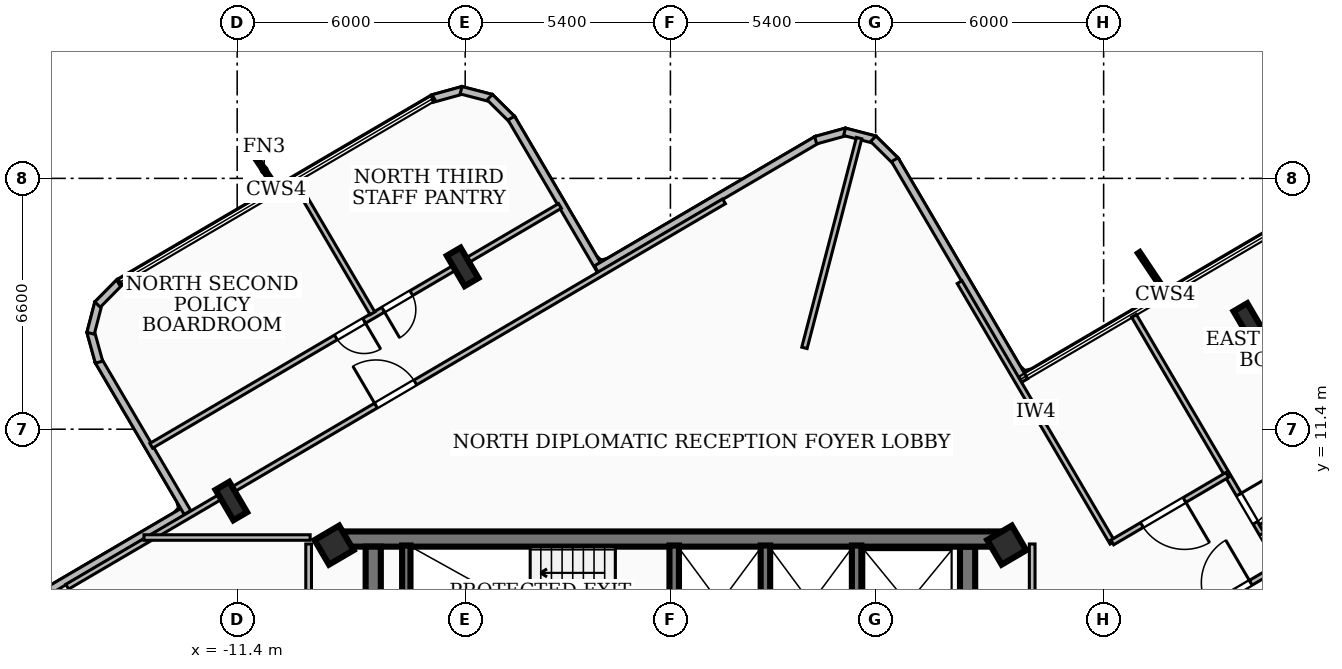
"""IFC4 building model, lengths in metres.
Left out: names, types, materials, properties, quantities, classifications, styles, units other than length and angle.
Written with IfcOpenShell. Run it as: python <this file> out.ifc"""

import sys

from ifc_helpers import new_model, si_unit, direction, frame, frame_2d, origin, origin_2d, place, context, subcontext, project, spatial, rectangle, i_section, extrude, element, fill, save


model = new_model("IFC4")
c1 = context("Model", 3, precision=1e-05, world=origin(), true_north=direction((0.0, 1.0)))
c2 = subcontext(c1, "Body", "Model", "MODEL_VIEW")
j1 = project(units=[si_unit("LENGTHUNIT", "METRE"), si_unit("PLANEANGLEUNIT", "RADIAN")], contexts=[c1])
p1 = place(None, origin())
s1 = spatial("IfcSite", under=j1, at=p1, CompositionType="ELEMENT")
p2 = place(p1, origin())
s2 = spatial("IfcBuilding", under=s1, at=p2, CompositionType="ELEMENT")
p3 = place(p2, frame((0.0, 0.0, 205.2)))
s3 = spatial("IfcBuildingStorey", under=s2, at=p3, CompositionType="ELEMENT", Elevation=205.2)
p4 = place(p3, frame((-8.78, 8.51, 0.0), z_axis=(0.0, 0.0, 1.0), x_axis=(1.0, 0.0, 0.0)))
e1 = element("IfcWall", 1, at=p4, inside=s3, PredefinedType="SHEAR", context=c2, shape_type="SweptSolid", body=[
    extrude(rectangle(XDim=17.56, YDim=0.4, at=frame_2d((8.78, 0.0))), origin(), (0.0, 0.0, 1.0), 3.16),
])
for number, where, z_axis, x_axis in (
    (2, (-7.82, 1.95, 0.0), (0.0, 0.0, 1.0), (0.0, 1.0, 0.0)),
    (3, (7.82, 8.31, 0.0), (0.0, 0.0, 1.0), (0.0, -1.0, 0.0)),
):
    element("IfcWall", number, at=place(p3, frame(where, z_axis=z_axis, x_axis=x_axis)), inside=s3, PredefinedType="SHEAR", context=c2, shape_type="SweptSolid", body=[
        extrude(rectangle(XDim=6.36, YDim=0.4, at=frame_2d((3.18, 0.0))), origin(), (0.0, 0.0, 1.0), 3.16),
    ])
p5 = place(p3, frame((-6.95, 5.28, 0.0), z_axis=(0.0, 0.0, 1.0), x_axis=(0.0, 1.0, 0.0)))
e4 = element("IfcWall", 4, at=p5, inside=s3, PredefinedType="SOLIDWALL", context=c2, shape_type="SweptSolid", body=[
    extrude(rectangle(XDim=3.06, YDim=0.22, at=frame_2d((1.53, 0.0))), origin(), (0.0, 0.0, 1.0), 3.16),
])
for number, where, z_axis, x_axis in (
    (5, (0.1, 5.3, 0.0), (0.0, 0.0, 1.0), (0.0, 1.0, 0.0)),
    (6, (2.5, 5.3, 0.0), (0.0, 0.0, 1.0), (0.0, 1.0, 0.0)),
    (7, (4.9, 5.3, 0.0), (0.0, 0.0, 1.0), (0.0, 1.0, 0.0)),
):
    element("IfcWall", number, at=place(p3, frame(where, z_axis=z_axis, x_axis=x_axis)), inside=s3, PredefinedType="SOLIDWALL", context=c2, shape_type="SweptSolid", body=[
        extrude(rectangle(XDim=3.04, YDim=0.25, at=frame_2d((1.52, 0.0))), origin(), (0.0, 0.0, 1.0), 3.16),
    ])
for number, where, z_axis, x_axis in (
    (8, (-8.85, 8.35, 0.0), (0.0, 0.0, 1.0), (0.863, 0.506, 0.0)),
    (9, (8.85, 8.35, 0.0), (0.0, 0.0, 1.0), (0.863, 0.506, 0.0)),
):
    element("IfcColumn", number, at=place(p3, frame(where, z_axis=z_axis, x_axis=x_axis)), inside=s3, PredefinedType="COLUMN", context=c2, shape_type="SweptSolid", body=[
        extrude(rectangle(XDim=0.75, YDim=0.75, at=origin_2d()), origin(), (0.0, 0.0, 1.0), 3.42),
    ])
for number, where, z_axis, x_axis in (
    (10, (15.234, 14.209, 0.0), (0.0, 0.0, 1.0), (0.863, 0.506, 0.0)),
    (11, (-5.468, 15.671, 0.0), (0.0, 0.0, 1.0), (0.863, 0.506, 0.0)),
    (12, (-11.554, 9.51, 0.0), (0.0, 0.0, 1.0), (0.863, 0.506, 0.0)),
):
    element("IfcColumn", number, at=place(p3, frame(where, z_axis=z_axis, x_axis=x_axis)), inside=s3, PredefinedType="COLUMN", context=c2, shape_type="SweptSolid", body=[
        extrude(i_section(OverallWidth=0.418, OverallDepth=0.927, WebThickness=0.019, FlangeThickness=0.032, at=origin_2d()), origin(), (0.0, 0.0, 1.0), 3.42),
    ])
p6 = place(p3, frame((-18.492, 5.904, 0.0), z_axis=(0.0, 0.0, 1.0), x_axis=(0.86245977502, 0.506125613333, 0.0)))
e13 = element("IfcWall", 13, at=p6, inside=s3, PredefinedType="SOLIDWALL", context=c2, shape_type="SweptSolid", body=[
    extrude(rectangle(XDim=6.741, YDim=0.2, at=frame_2d((3.371, 0.0))), origin(), (0.0, 0.0, 1.0), 3.16),
])
p7 = place(p3, frame((-12.707, 9.207, 0.0), z_axis=(0.0, 0.0, 1.0), x_axis=(-0.505936854923, 0.862570518178, 0.0)))
e14 = element("IfcWall", 14, at=p7, inside=s3, PredefinedType="SOLIDWALL", context=c2, shape_type="SweptSolid", body=[
    extrude(rectangle(XDim=4.641, YDim=0.2, at=frame_2d((2.32, 0.0))), origin(), (0.0, 0.0, 1.0), 3.16),
])
p8 = place(p3, frame((-15.035, 13.164, 0.0), z_axis=(0.0, 0.0, 1.0), x_axis=(-0.266246353668, 0.963905015631, 0.0)))
e15 = element("IfcWall", 15, at=p8, inside=s3, PredefinedType="SOLIDWALL", context=c2, shape_type="SweptSolid", body=[
    extrude(rectangle(XDim=0.838, YDim=0.2, at=frame_2d((0.419, 0.0))), origin(), (0.0, 0.0, 1.0), 3.16),
])
p9 = place(p3, frame((-15.257, 13.924, 0.0), z_axis=(0.0, 0.0, 1.0), x_axis=(0.251167733737, 0.967943577658, 0.0)))
e16 = element("IfcWall", 16, at=p9, inside=s3, PredefinedType="SOLIDWALL", context=c2, shape_type="SweptSolid", body=[
    extrude(rectangle(XDim=0.824, YDim=0.2, at=frame_2d((0.412, 0.0))), origin(), (0.0, 0.0, 1.0), 3.16),
])
p10 = place(p3, frame((-15.074, 14.68, 0.0), z_axis=(0.0, 0.0, 1.0), x_axis=(0.702877524881, 0.711310891957, 0.0)))
e17 = element("IfcWall", 17, at=p10, inside=s3, PredefinedType="SOLIDWALL", context=c2, shape_type="SweptSolid", body=[
    extrude(rectangle(XDim=0.84, YDim=0.2, at=frame_2d((0.42, 0.0))), origin(), (0.0, 0.0, 1.0), 3.16),
])
p11 = place(p3, frame((-6.269, 20.097, 0.0), z_axis=(0.0, 0.0, 1.0), x_axis=(0.963925656212, 0.266171616247, 0.0)))
e18 = element("IfcWall", 18, at=p11, inside=s3, PredefinedType="SOLIDWALL", context=c2, shape_type="SweptSolid", body=[
    extrude(rectangle(XDim=0.838, YDim=0.2, at=frame_2d((0.419, 0.0))), origin(), (0.0, 0.0, 1.0), 3.16),
])
p12 = place(p3, frame((-5.509, 20.319, 0.0), z_axis=(0.0, 0.0, 1.0), x_axis=(0.967962254737, -0.251095745493, 0.0)))
e19 = element("IfcWall", 19, at=p12, inside=s3, PredefinedType="SOLIDWALL", context=c2, shape_type="SweptSolid", body=[
    extrude(rectangle(XDim=0.824, YDim=0.2, at=frame_2d((0.412, 0.0))), origin(), (0.0, 0.0, 1.0), 3.16),
])
p13 = place(p3, frame((-4.753, 20.136, 0.0), z_axis=(0.0, 0.0, 1.0), x_axis=(0.711167178618, -0.70302293281, 0.0)))
e20 = element("IfcWall", 20, at=p13, inside=s3, PredefinedType="SOLIDWALL", context=c2, shape_type="SweptSolid", body=[
    extrude(rectangle(XDim=0.839, YDim=0.2, at=frame_2d((0.42, 0.0))), origin(), (0.0, 0.0, 1.0), 3.16),
])
p14 = place(p3, frame((-4.187, 19.586, 0.0), z_axis=(0.0, 0.0, 1.0), x_axis=(0.505936854923, -0.862570518178, 0.0)))
e21 = element("IfcWall", 21, at=p14, inside=s3, PredefinedType="SOLIDWALL", context=c2, shape_type="SweptSolid", body=[
    extrude(rectangle(XDim=4.641, YDim=0.2, at=frame_2d((2.32, 0.0))), origin(), (0.0, 0.0, 1.0), 3.16),
])
p15 = place(p3, frame((-1.948, 15.612, 0.0), z_axis=(0.0, 0.0, 1.0), x_axis=(0.86259717351, 0.505891407569, 0.0)))
e22 = element("IfcWall", 22, at=p15, inside=s3, PredefinedType="SOLIDWALL", context=c2, shape_type="SweptSolid", body=[
    extrude(rectangle(XDim=6.742, YDim=0.2, at=frame_2d((3.371, 0.0))), origin(), (0.0, 0.0, 1.0), 3.16),
])
p16 = place(p3, frame((3.822, 19.003, 0.0), z_axis=(0.0, 0.0, 1.0), x_axis=(0.963905015631, 0.266246353668, 0.0)))
e23 = element("IfcWall", 23, at=p16, inside=s3, PredefinedType="SOLIDWALL", context=c2, shape_type="SweptSolid", body=[
    extrude(rectangle(XDim=0.838, YDim=0.2, at=frame_2d((0.419, 0.0))), origin(), (0.0, 0.0, 1.0), 3.16),
])
p17 = place(p3, frame((4.582, 19.225, 0.0), z_axis=(0.0, 0.0, 1.0), x_axis=(0.967943577658, -0.251167733737, 0.0)))
e24 = element("IfcWall", 24, at=p17, inside=s3, PredefinedType="SOLIDWALL", context=c2, shape_type="SweptSolid", body=[
    extrude(rectangle(XDim=0.824, YDim=0.2, at=frame_2d((0.412, 0.0))), origin(), (0.0, 0.0, 1.0), 3.16),
])
p18 = place(p3, frame((5.338, 19.042, 0.0), z_axis=(0.0, 0.0, 1.0), x_axis=(0.711310891957, -0.702877524881, 0.0)))
e25 = element("IfcWall", 25, at=p18, inside=s3, PredefinedType="SOLIDWALL", context=c2, shape_type="SweptSolid", body=[
    extrude(rectangle(XDim=0.84, YDim=0.2, at=frame_2d((0.42, 0.0))), origin(), (0.0, 0.0, 1.0), 3.16),
])
p19 = place(p3, frame((5.904, 18.492, 0.0), z_axis=(0.0, 0.0, 1.0), x_axis=(0.506017844805, -0.862523008817, 0.0)))
e26 = element("IfcWall", 26, at=p19, inside=s3, PredefinedType="SOLIDWALL", context=c2, shape_type="SweptSolid", body=[
    extrude(rectangle(XDim=6.741, YDim=0.2, at=frame_2d((3.37, 0.0))), origin(), (0.0, 0.0, 1.0), 3.16),
])
p20 = place(p3, frame((-9.52, 1.75, 0.0), z_axis=(0.0, 0.0, 1.0), x_axis=(0.0, 1.0, 0.0)))
e27 = element("IfcWall", 27, at=p20, inside=s3, PredefinedType="PARTITIONING", context=c2, shape_type="SweptSolid", body=[
    extrude(rectangle(XDim=6.63, YDim=0.15, at=frame_2d((3.315, 0.0))), origin(), (0.0, 0.0, 1.0), 3.16),
])
p21 = place(p3, frame((9.52, 1.75, 0.0), z_axis=(0.0, 0.0, 1.0), x_axis=(0.0, 1.0, 0.0)))
e28 = element("IfcWall", 28, at=p21, inside=s3, PredefinedType="PARTITIONING", context=c2, shape_type="SweptSolid", body=[
    extrude(rectangle(XDim=6.63, YDim=0.15, at=frame_2d((3.315, 0.0))), origin(), (0.0, 0.0, 1.0), 2.53),
])
p22 = place(p3, frame((-13.854, 8.55, 0.0), z_axis=(0.0, 0.0, 1.0), x_axis=(1.0, 0.0, 0.0)))
e29 = element("IfcWall", 29, at=p22, inside=s3, PredefinedType="PARTITIONING", context=c2, shape_type="SweptSolid", body=[
    extrude(rectangle(XDim=4.374, YDim=0.145, at=frame_2d((2.187, 0.0))), origin(), (0.0, 0.0, 1.0), 2.53),
])
p23 = place(p3, frame((3.527, 13.54, 0.0), z_axis=(0.0, 0.0, 1.0), x_axis=(0.252132617321, 0.967692690519, 0.0)))
e30 = element("IfcWall", 30, at=p23, inside=s3, PredefinedType="PARTITIONING", context=c2, shape_type="SweptSolid", body=[
    extrude(rectangle(XDim=5.703, YDim=0.145, at=frame_2d((2.852, 0.0))), origin(), (0.0, 0.0, 1.0), 3.16),
])
p24 = place(p3, frame((11.632, 8.413, 0.0), z_axis=(0.0, 0.0, 1.0), x_axis=(-0.506057561451, 0.862499706955, 0.0)))
e31 = element("IfcWall", 31, at=p24, inside=s3, PredefinedType="PARTITIONING", context=c2, shape_type="SweptSolid", body=[
    extrude(rectangle(XDim=7.95, YDim=0.145, at=frame_2d((3.975, 0.0))), origin(), (0.0, 0.0, 1.0), 2.53),
])
p25 = place(p3, frame((14.654, 10.198, 0.0), z_axis=(0.0, 0.0, 1.0), x_axis=(-0.862375516706, -0.506269165747, 0.0)))
e32 = element("IfcWall", 32, at=p25, inside=s3, PredefinedType="PARTITIONING", context=c2, shape_type="SweptSolid", body=[
    extrude(rectangle(XDim=3.51, YDim=0.145, at=frame_2d((1.755, 0.0))), origin(), (0.0, 0.0, 1.0), 2.53),
])
p26 = place(p25, frame((1.305, 0.0, 0.0)))
e33 = element("IfcOpeningElement", 33, at=p26, cuts=e32, PredefinedType="OPENING", context=c2, shape_type="SweptSolid", body=[
    extrude(rectangle(XDim=1.3, YDim=2.1, at=frame_2d((0.65, 1.05))), frame((0.0, 0.083, 0.0), z_axis=(0.0, -1.0, 0.0), x_axis=(1.0, 0.0, 0.0)), (0.0, 0.0, 1.0), 0.165),
])
p27 = place(p3, frame((13.024, 6.041, 0.0), z_axis=(0.0, 0.0, 1.0), x_axis=(0.862527334663, 0.506010471195, 0.0)))
e34 = element("IfcWall", 34, at=p27, inside=s3, PredefinedType="PARTITIONING", context=c2, shape_type="SweptSolid", body=[
    extrude(rectangle(XDim=3.51, YDim=0.145, at=frame_2d((1.755, 0.0))), origin(), (0.0, 0.0, 1.0), 3.16),
])
p28 = place(p27, frame((1.305, 0.0, 0.0)))
e35 = element("IfcOpeningElement", 35, at=p28, cuts=e34, PredefinedType="OPENING", context=c2, shape_type="SweptSolid", body=[
    extrude(rectangle(XDim=1.3, YDim=2.1, at=frame_2d((0.65, 1.05))), frame((0.0, 0.083, 0.0), z_axis=(0.0, -1.0, 0.0), x_axis=(1.0, 0.0, 0.0)), (0.0, 0.0, 1.0), 0.165),
])
p29 = place(p3, frame((15.531, 8.822, 0.0), z_axis=(0.0, 0.0, 1.0), x_axis=(0.862494081005, 0.506067149923, 0.0)))
e36 = element("IfcWall", 36, at=p29, inside=s3, PredefinedType="PARTITIONING", context=c2, shape_type="SweptSolid", body=[
    extrude(rectangle(XDim=6.776, YDim=0.145, at=frame_2d((3.388, 0.0))), origin(), (0.0, 0.0, 1.0), 2.53),
])
p30 = place(p3, frame((12.198, 14.385, 0.0), z_axis=(0.0, 0.0, 1.0), x_axis=(0.506037527975, -0.862511460956, 0.0)))
e37 = element("IfcWall", 37, at=p30, inside=s3, PredefinedType="PARTITIONING", context=c2, shape_type="SweptSolid", body=[
    extrude(rectangle(XDim=12.469, YDim=0.145, at=frame_2d((6.235, 0.0))), origin(), (0.0, 0.0, 1.0), 2.53),
])
p31 = place(p30, frame((6.655, 0.0, 0.0)))
e38 = element("IfcOpeningElement", 38, at=p31, cuts=e37, PredefinedType="OPENING", context=c2, shape_type="SweptSolid", body=[
    extrude(rectangle(XDim=0.86, YDim=2.04, at=frame_2d((0.43, 1.02))), frame((0.0, 0.083, 0.0), z_axis=(0.0, -1.0, 0.0), x_axis=(1.0, 0.0, 0.0)), (0.0, 0.0, 1.0), 0.165),
])
p32 = place(p30, frame((5.455, 0.0, 0.0)))
e39 = element("IfcOpeningElement", 39, at=p32, cuts=e37, PredefinedType="OPENING", context=c2, shape_type="SweptSolid", body=[
    extrude(rectangle(XDim=0.86, YDim=2.04, at=frame_2d((0.43, 1.02))), frame((0.0, 0.083, 0.0), z_axis=(0.0, -1.0, 0.0), x_axis=(1.0, 0.0, 0.0)), (0.0, 0.0, 1.0), 0.165),
])
p33 = place(p3, frame((-15.873, 7.255, 0.0), z_axis=(0.0, 0.0, 1.0), x_axis=(0.862498672631, 0.506059324299, 0.0)))
e40 = element("IfcWall", 40, at=p33, inside=s3, PredefinedType="PARTITIONING", context=c2, shape_type="SweptSolid", body=[
    extrude(rectangle(XDim=20.039, YDim=0.145, at=frame_2d((10.02, 0.0))), origin(), (0.0, 0.0, 1.0), 2.53),
])
p34 = place(p33, frame((9.42, 0.0, 0.0)))
e41 = element("IfcOpeningElement", 41, at=p34, cuts=e40, PredefinedType="OPENING", context=c2, shape_type="SweptSolid", body=[
    extrude(rectangle(XDim=1.2, YDim=2.1, at=frame_2d((0.6, 1.05))), frame((0.0, 0.083, 0.0), z_axis=(0.0, -1.0, 0.0), x_axis=(1.0, 0.0, 0.0)), (0.0, 0.0, 1.0), 0.165),
])
p35 = place(p3, frame((-7.84, 14.449, 0.0), z_axis=(0.0, 0.0, 1.0), x_axis=(-0.505991637753, 0.862538383218, 0.0)))
e42 = element("IfcWall", 42, at=p35, inside=s3, PredefinedType="PARTITIONING", context=c2, shape_type="SweptSolid", body=[
    extrude(rectangle(XDim=4.006, YDim=0.145, at=frame_2d((2.003, 0.0))), origin(), (0.0, 0.0, 1.0), 3.16),
])
p36 = place(p3, frame((-2.906, 17.275, 0.0), z_axis=(0.0, 0.0, 1.0), x_axis=(-0.862505879614, -0.506047040927, 0.0)))
e43 = element("IfcWall", 43, at=p36, inside=s3, PredefinedType="PARTITIONING", context=c2, shape_type="SweptSolid", body=[
    extrude(rectangle(XDim=12.471, YDim=0.145, at=frame_2d((6.235, 0.0))), origin(), (0.0, 0.0, 1.0), 2.53),
])
p37 = place(p36, frame((4.535, 0.0, 0.0)))
e44 = element("IfcOpeningElement", 44, at=p37, cuts=e43, PredefinedType="OPENING", context=c2, shape_type="SweptSolid", body=[
    extrude(rectangle(XDim=0.86, YDim=2.04, at=frame_2d((0.43, 1.02))), frame((0.0, 0.083, 0.0), z_axis=(0.0, -1.0, 0.0), x_axis=(1.0, 0.0, 0.0)), (0.0, 0.0, 1.0), 0.165),
])
p38 = place(p36, frame((5.975, 0.0, 0.0)))
e45 = element("IfcOpeningElement", 45, at=p38, cuts=e43, PredefinedType="OPENING", context=c2, shape_type="SweptSolid", body=[
    extrude(rectangle(XDim=0.86, YDim=2.04, at=frame_2d((0.43, 1.02))), frame((0.0, 0.083, 0.0), z_axis=(0.0, -1.0, 0.0), x_axis=(1.0, 0.0, 0.0)), (0.0, 0.0, 1.0), 0.165),
])
p39 = place(p26, origin())
e46 = element("IfcDoor", 46, at=p39, inside=s3, OperationType="SINGLE_SWING_LEFT", PredefinedType="DOOR", context=c2, shape_type="SweptSolid", body=[
    extrude(rectangle(XDim=1.3, YDim=2.1, at=frame_2d((0.65, 1.05))), frame((0.0, 0.025, 0.0), z_axis=(0.0, -1.0, 0.0), x_axis=(1.0, 0.0, 0.0)), (0.0, 0.0, 1.0), 0.05),
])
fill(e33, e46)
p40 = place(p28, origin())
e47 = element("IfcDoor", 47, at=p40, inside=s3, OperationType="SINGLE_SWING_RIGHT", PredefinedType="DOOR", context=c2, shape_type="SweptSolid", body=[
    extrude(rectangle(XDim=1.3, YDim=2.1, at=frame_2d((0.65, 1.05))), frame((0.0, 0.025, 0.0), z_axis=(0.0, -1.0, 0.0), x_axis=(1.0, 0.0, 0.0)), (0.0, 0.0, 1.0), 0.05),
])
fill(e35, e47)
p41 = place(p31, origin())
e48 = element("IfcDoor", 48, at=p41, inside=s3, OperationType="SINGLE_SWING_RIGHT", PredefinedType="DOOR", context=c2, shape_type="SweptSolid", body=[
    extrude(rectangle(XDim=0.86, YDim=2.04, at=frame_2d((0.43, 1.02))), frame((0.0, 0.025, 0.0), z_axis=(0.0, -1.0, 0.0), x_axis=(1.0, 0.0, 0.0)), (0.0, 0.0, 1.0), 0.05),
])
fill(e38, e48)
p42 = place(p32, origin())
e49 = element("IfcDoor", 49, at=p42, inside=s3, OperationType="SINGLE_SWING_LEFT", PredefinedType="DOOR", context=c2, shape_type="SweptSolid", body=[
    extrude(rectangle(XDim=0.86, YDim=2.04, at=frame_2d((0.43, 1.02))), frame((0.0, 0.025, 0.0), z_axis=(0.0, -1.0, 0.0), x_axis=(1.0, 0.0, 0.0)), (0.0, 0.0, 1.0), 0.05),
])
fill(e39, e49)
p43 = place(p34, origin())
e50 = element("IfcDoor", 50, at=p43, inside=s3, OperationType="SINGLE_SWING_LEFT", PredefinedType="DOOR", context=c2, shape_type="SweptSolid", body=[
    extrude(rectangle(XDim=1.2, YDim=2.1, at=frame_2d((0.6, 1.05))), frame((0.0, 0.025, 0.0), z_axis=(0.0, -1.0, 0.0), x_axis=(1.0, 0.0, 0.0)), (0.0, 0.0, 1.0), 0.05),
])
fill(e41, e50)
p44 = place(p37, origin())
e51 = element("IfcDoor", 51, at=p44, inside=s3, OperationType="SINGLE_SWING_RIGHT", PredefinedType="DOOR", context=c2, shape_type="SweptSolid", body=[
    extrude(rectangle(XDim=0.86, YDim=2.04, at=frame_2d((0.43, 1.02))), frame((0.0, 0.025, 0.0), z_axis=(0.0, -1.0, 0.0), x_axis=(1.0, 0.0, 0.0)), (0.0, 0.0, 1.0), 0.05),
])
fill(e44, e51)
p45 = place(p38, origin())
e52 = element("IfcDoor", 52, at=p45, inside=s3, OperationType="SINGLE_SWING_LEFT", PredefinedType="DOOR", context=c2, shape_type="SweptSolid", body=[
    extrude(rectangle(XDim=0.86, YDim=2.04, at=frame_2d((0.43, 1.02))), frame((0.0, 0.025, 0.0), z_axis=(0.0, -1.0, 0.0), x_axis=(1.0, 0.0, 0.0)), (0.0, 0.0, 1.0), 0.05),
])
fill(e45, e52)
save(model, sys.argv[1])
